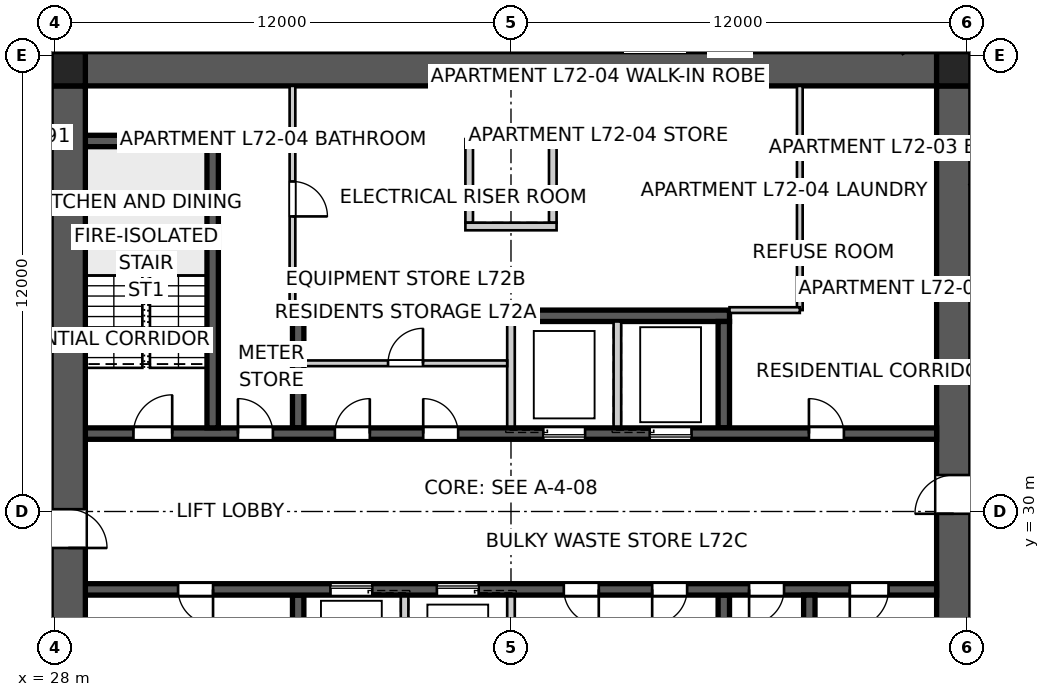
"""IFC4 building model, lengths in metres.
Left out: names, types, materials, properties, quantities, classifications, styles, units other than length and angle.
Written with IfcOpenShell. Run it as: python <this file> out.ifc"""

import sys

from ifc_helpers import new_model, si_unit, direction, frame, frame_2d, origin, origin_2d, place, context, subcontext, project, spatial, polyline, rectangle, outline, extrude, element, fill, save


model = new_model("IFC4")
c1 = context("Model", 3, precision=1e-05, world=origin(), true_north=direction((0.0, 1.0)))
c2 = subcontext(c1, "Body", "Model", "MODEL_VIEW")
j1 = project(units=[si_unit("LENGTHUNIT", "METRE"), si_unit("PLANEANGLEUNIT", "RADIAN")], contexts=[c1])
p1 = place(None, origin())
s1 = spatial("IfcSite", under=j1, at=p1, CompositionType="ELEMENT")
p2 = place(p1, origin())
s2 = spatial("IfcBuilding", under=s1, at=p2, CompositionType="ELEMENT")
p3 = place(p2, frame((0.0, 0.0, 260.8)))
s3 = spatial("IfcBuildingStorey", under=s2, at=p3, CompositionType="ELEMENT", Elevation=260.8)
p4 = place(p3, frame((28.8, 41.65, 0.0), z_axis=(0.0, 0.0, 1.0), x_axis=(1.0, 0.0, 0.0)))
e1 = element("IfcWall", 1, at=p4, inside=s3, PredefinedType="SHEAR", context=c2, shape_type="SweptSolid", body=[
    extrude(outline(polyline([(0.0, -0.45), (22.4, -0.45), (22.4, -0.025), (22.85, -0.025), (22.85, 0.025), (22.4, 0.025), (22.4, 0.45), (0.0, 0.45), (0.0, 0.025), (-0.45, 0.025), (-0.45, -0.025), (0.0, -0.025), (0.0, -0.45)])), origin(), (0.0, 0.0, 1.0), 3.4),
])
p5 = place(p3, frame((51.65, 18.8, 0.0), z_axis=(0.0, 0.0, 1.0), x_axis=(0.0, 1.0, 0.0)))
e2 = element("IfcWall", 2, at=p5, inside=s3, PredefinedType="SHEAR", context=c2, shape_type="SweptSolid", body=[
    extrude(outline(polyline([(0.0, -0.45), (22.4, -0.45), (22.4, -0.025), (22.85, -0.025), (22.85, 0.025), (22.4, 0.025), (22.4, 0.45), (0.0, 0.45), (0.0, 0.025), (-0.45, 0.025), (-0.45, -0.025), (0.0, -0.025), (0.0, -0.45)])), origin(), (0.0, 0.0, 1.0), 3.4),
])
p6 = place(p5, frame((11.14, 0.0, 0.0)))
e3 = element("IfcOpeningElement", 3, at=p6, cuts=e2, PredefinedType="OPENING", context=c2, shape_type="SweptSolid", body=[
    extrude(rectangle(XDim=1.02, YDim=2.4, at=frame_2d((0.51, 1.2))), frame((0.0, 0.46, 0.0), z_axis=(0.0, -1.0, 0.0), x_axis=(1.0, 0.0, 0.0)), (0.0, 0.0, 1.0), 0.92),
])
p7 = place(p3, frame((28.35, 41.2, 0.0), z_axis=(0.0, 0.0, 1.0), x_axis=(0.0, -1.0, 0.0)))
e4 = element("IfcWall", 4, at=p7, inside=s3, PredefinedType="SHEAR", context=c2, shape_type="SweptSolid", body=[
    extrude(outline(polyline([(0.0, -0.45), (22.4, -0.45), (22.4, -0.025), (22.85, -0.025), (22.85, 0.025), (22.4, 0.025), (22.4, 0.45), (0.0, 0.45), (0.0, 0.025), (-0.45, 0.025), (-0.45, -0.025), (0.0, -0.025), (0.0, -0.45)])), origin(), (0.0, 0.0, 1.0), 3.4),
])
p8 = place(p7, frame((11.14, 0.0, 0.0)))
e5 = element("IfcOpeningElement", 5, at=p8, cuts=e4, PredefinedType="OPENING", context=c2, shape_type="SweptSolid", body=[
    extrude(rectangle(XDim=1.02, YDim=2.4, at=frame_2d((0.51, 1.2))), frame((0.0, 0.46, 0.0), z_axis=(0.0, -1.0, 0.0), x_axis=(1.0, 0.0, 0.0)), (0.0, 0.0, 1.0), 0.92),
])
p9 = place(p3, frame((28.8, 32.05, 0.0), z_axis=(0.0, 0.0, 1.0), x_axis=(1.0, 0.0, 0.0)))
e6 = element("IfcWall", 6, at=p9, inside=s3, PredefinedType="SHEAR", context=c2, shape_type="SweptSolid", body=[
    extrude(rectangle(XDim=22.4, YDim=0.3, at=frame_2d((11.2, 0.0))), origin(), (0.0, 0.0, 1.0), 3.4),
])
p10 = place(p9, frame((19.04, 0.0, 0.0)))
e7 = element("IfcOpeningElement", 7, at=p10, cuts=e6, PredefinedType="OPENING", context=c2, shape_type="SweptSolid", body=[
    extrude(rectangle(XDim=0.92, YDim=2.1, at=frame_2d((0.46, 1.05))), frame((0.0, 0.16, 0.0), z_axis=(0.0, -1.0, 0.0), x_axis=(1.0, 0.0, 0.0)), (0.0, 0.0, 1.0), 0.32),
])
p11 = place(p9, frame((1.265, 0.0, 0.0)))
e8 = element("IfcOpeningElement", 8, at=p11, cuts=e6, PredefinedType="OPENING", context=c2, shape_type="SweptSolid", body=[
    extrude(rectangle(XDim=1.02, YDim=2.1, at=frame_2d((0.51, 1.05))), frame((0.0, 0.16, 0.0), z_axis=(0.0, -1.0, 0.0), x_axis=(1.0, 0.0, 0.0)), (0.0, 0.0, 1.0), 0.32),
])
p12 = place(p9, frame((4.015, 0.0, 0.0)))
e9 = element("IfcOpeningElement", 9, at=p12, cuts=e6, PredefinedType="OPENING", context=c2, shape_type="SweptSolid", body=[
    extrude(rectangle(XDim=0.92, YDim=2.1, at=frame_2d((0.46, 1.05))), frame((0.0, 0.16, 0.0), z_axis=(0.0, -1.0, 0.0), x_axis=(1.0, 0.0, 0.0)), (0.0, 0.0, 1.0), 0.32),
])
p13 = place(p9, frame((6.565, 0.0, 0.0)))
e10 = element("IfcOpeningElement", 10, at=p13, cuts=e6, PredefinedType="OPENING", context=c2, shape_type="SweptSolid", body=[
    extrude(rectangle(XDim=0.92, YDim=2.1, at=frame_2d((0.46, 1.05))), frame((0.0, 0.16, 0.0), z_axis=(0.0, -1.0, 0.0), x_axis=(1.0, 0.0, 0.0)), (0.0, 0.0, 1.0), 0.32),
])
p14 = place(p9, frame((8.89, 0.0, 0.0)))
e11 = element("IfcOpeningElement", 11, at=p14, cuts=e6, PredefinedType="OPENING", context=c2, shape_type="SweptSolid", body=[
    extrude(rectangle(XDim=0.92, YDim=2.1, at=frame_2d((0.46, 1.05))), frame((0.0, 0.16, 0.0), z_axis=(0.0, -1.0, 0.0), x_axis=(1.0, 0.0, 0.0)), (0.0, 0.0, 1.0), 0.32),
])
p15 = place(p9, frame((12.05, 0.0, 0.0)))
e12 = element("IfcOpeningElement", 12, at=p15, cuts=e6, PredefinedType="OPENING", context=c2, shape_type="SweptSolid", body=[
    extrude(rectangle(XDim=1.1, YDim=2.1, at=frame_2d((0.55, 1.05))), frame((0.0, 0.16, 0.0), z_axis=(0.0, -1.0, 0.0), x_axis=(1.0, 0.0, 0.0)), (0.0, 0.0, 1.0), 0.32),
])
p16 = place(p9, frame((14.85, 0.0, 0.0)))
e13 = element("IfcOpeningElement", 13, at=p16, cuts=e6, PredefinedType="OPENING", context=c2, shape_type="SweptSolid", body=[
    extrude(rectangle(XDim=1.1, YDim=2.1, at=frame_2d((0.55, 1.05))), frame((0.0, 0.16, 0.0), z_axis=(0.0, -1.0, 0.0), x_axis=(1.0, 0.0, 0.0)), (0.0, 0.0, 1.0), 0.32),
])
p17 = place(p3, frame((51.2, 27.95, 0.0), z_axis=(0.0, 0.0, 1.0), x_axis=(-1.0, 0.0, 0.0)))
e14 = element("IfcWall", 14, at=p17, inside=s3, PredefinedType="SHEAR", context=c2, shape_type="SweptSolid", body=[
    extrude(rectangle(XDim=22.4, YDim=0.3, at=frame_2d((11.2, 0.0))), origin(), (0.0, 0.0, 1.0), 3.4),
])
p18 = place(p17, frame((19.04, 0.0, 0.0)))
e15 = element("IfcOpeningElement", 15, at=p18, cuts=e14, PredefinedType="OPENING", context=c2, shape_type="SweptSolid", body=[
    extrude(rectangle(XDim=0.92, YDim=2.1, at=frame_2d((0.46, 1.05))), frame((0.0, 0.16, 0.0), z_axis=(0.0, -1.0, 0.0), x_axis=(1.0, 0.0, 0.0)), (0.0, 0.0, 1.0), 0.32),
])
p19 = place(p17, frame((1.265, 0.0, 0.0)))
e16 = element("IfcOpeningElement", 16, at=p19, cuts=e14, PredefinedType="OPENING", context=c2, shape_type="SweptSolid", body=[
    extrude(rectangle(XDim=1.02, YDim=2.1, at=frame_2d((0.51, 1.05))), frame((0.0, 0.16, 0.0), z_axis=(0.0, -1.0, 0.0), x_axis=(1.0, 0.0, 0.0)), (0.0, 0.0, 1.0), 0.32),
])
p20 = place(p17, frame((4.015, 0.0, 0.0)))
e17 = element("IfcOpeningElement", 17, at=p20, cuts=e14, PredefinedType="OPENING", context=c2, shape_type="SweptSolid", body=[
    extrude(rectangle(XDim=0.92, YDim=2.1, at=frame_2d((0.46, 1.05))), frame((0.0, 0.16, 0.0), z_axis=(0.0, -1.0, 0.0), x_axis=(1.0, 0.0, 0.0)), (0.0, 0.0, 1.0), 0.32),
])
p21 = place(p17, frame((8.89, 0.0, 0.0)))
e18 = element("IfcOpeningElement", 18, at=p21, cuts=e14, PredefinedType="OPENING", context=c2, shape_type="SweptSolid", body=[
    extrude(rectangle(XDim=0.92, YDim=2.1, at=frame_2d((0.46, 1.05))), frame((0.0, 0.16, 0.0), z_axis=(0.0, -1.0, 0.0), x_axis=(1.0, 0.0, 0.0)), (0.0, 0.0, 1.0), 0.32),
])
p22 = place(p17, frame((6.565, 0.0, 0.0)))
e19 = element("IfcOpeningElement", 19, at=p22, cuts=e14, PredefinedType="OPENING", context=c2, shape_type="SweptSolid", body=[
    extrude(rectangle(XDim=0.92, YDim=2.1, at=frame_2d((0.46, 1.05))), frame((0.0, 0.16, 0.0), z_axis=(0.0, -1.0, 0.0), x_axis=(1.0, 0.0, 0.0)), (0.0, 0.0, 1.0), 0.32),
])
p23 = place(p17, frame((12.05, 0.0, 0.0)))
e20 = element("IfcOpeningElement", 20, at=p23, cuts=e14, PredefinedType="OPENING", context=c2, shape_type="SweptSolid", body=[
    extrude(rectangle(XDim=1.1, YDim=2.1, at=frame_2d((0.55, 1.05))), frame((0.0, 0.16, 0.0), z_axis=(0.0, -1.0, 0.0), x_axis=(1.0, 0.0, 0.0)), (0.0, 0.0, 1.0), 0.32),
])
p24 = place(p17, frame((14.85, 0.0, 0.0)))
e21 = element("IfcOpeningElement", 21, at=p24, cuts=e14, PredefinedType="OPENING", context=c2, shape_type="SweptSolid", body=[
    extrude(rectangle(XDim=1.1, YDim=2.1, at=frame_2d((0.55, 1.05))), frame((0.0, 0.16, 0.0), z_axis=(0.0, -1.0, 0.0), x_axis=(1.0, 0.0, 0.0)), (0.0, 0.0, 1.0), 0.32),
])
p25 = place(p3, frame((34.25, 35.15, 0.0), z_axis=(0.0, 0.0, 1.0), x_axis=(1.0, 0.0, 0.0)))
e22 = element("IfcWall", 22, at=p25, inside=s3, PredefinedType="SHEAR", context=c2, shape_type="SweptSolid", body=[
    extrude(rectangle(XDim=11.5, YDim=0.3, at=frame_2d((5.75, 0.0))), origin(), (0.0, 0.0, 1.0), 3.4),
])
for number, where, z_axis, x_axis in (
    (23, (34.4, 32.2, 0.0), (0.0, 0.0, 1.0), (0.0, 1.0, 0.0)),
    (24, (45.6, 27.8, 0.0), (0.0, 0.0, 1.0), (0.0, -1.0, 0.0)),
):
    element("IfcWall", number, at=place(p3, frame(where, z_axis=z_axis, x_axis=x_axis)), inside=s3, PredefinedType="SHEAR", context=c2, shape_type="SweptSolid", body=[
        extrude(rectangle(XDim=2.8, YDim=0.3, at=frame_2d((1.4, 0.0))), origin(), (0.0, 0.0, 1.0), 3.4),
    ])
for number, where, z_axis, x_axis in (
    (25, (40.0, 32.2, 0.0), (0.0, 0.0, 1.0), (0.0, 1.0, 0.0)),
    (26, (40.0, 27.8, 0.0), (0.0, 0.0, 1.0), (0.0, -1.0, 0.0)),
    (27, (42.8, 32.2, 0.0), (0.0, 0.0, 1.0), (0.0, 1.0, 0.0)),
    (28, (37.2, 27.8, 0.0), (0.0, 0.0, 1.0), (0.0, -1.0, 0.0)),
):
    element("IfcWall", number, at=place(p3, frame(where, z_axis=z_axis, x_axis=x_axis)), inside=s3, PredefinedType="SOLIDWALL", context=c2, shape_type="SweptSolid", body=[
        extrude(rectangle(XDim=2.8, YDim=0.2, at=frame_2d((1.4, 0.0))), origin(), (0.0, 0.0, 1.0), 3.4),
    ])
for number, where, z_axis, x_axis in (
    (29, (45.6, 32.2, 0.0), (0.0, 0.0, 1.0), (0.0, 1.0, 0.0)),
    (30, (34.4, 27.8, 0.0), (0.0, 0.0, 1.0), (0.0, -1.0, 0.0)),
):
    element("IfcWall", number, at=place(p3, frame(where, z_axis=z_axis, x_axis=x_axis)), inside=s3, PredefinedType="SHEAR", context=c2, shape_type="SweptSolid", body=[
        extrude(rectangle(XDim=2.8, YDim=0.3, at=frame_2d((1.4, 0.0))), origin(), (0.0, 0.0, 1.0), 3.4),
    ])
p26 = place(p3, frame((32.15, 32.2, 0.0), z_axis=(0.0, 0.0, 1.0), x_axis=(0.0, 1.0, 0.0)))
e31 = element("IfcWall", 31, at=p26, inside=s3, PredefinedType="SHEAR", context=c2, shape_type="SweptSolid", body=[
    extrude(rectangle(XDim=7.7, YDim=0.3, at=frame_2d((3.85, 0.0))), origin(), (0.0, 0.0, 1.0), 3.4),
])
p27 = place(p3, frame((28.8, 39.75, 0.0), z_axis=(0.0, 0.0, 1.0), x_axis=(1.0, 0.0, 0.0)))
e32 = element("IfcWall", 32, at=p27, inside=s3, PredefinedType="SHEAR", context=c2, shape_type="SweptSolid", body=[
    extrude(rectangle(XDim=3.5, YDim=0.3, at=frame_2d((1.75, 0.0))), origin(), (0.0, 0.0, 1.0), 3.4),
])
p28 = place(p3, frame((47.85, 27.8, 0.0), z_axis=(0.0, 0.0, 1.0), x_axis=(0.0, -1.0, 0.0)))
e33 = element("IfcWall", 33, at=p28, inside=s3, PredefinedType="SHEAR", context=c2, shape_type="SweptSolid", body=[
    extrude(rectangle(XDim=7.7, YDim=0.3, at=frame_2d((3.85, 0.0))), origin(), (0.0, 0.0, 1.0), 3.4),
])
for number, where, z_axis, x_axis in (
    (34, (38.9, 37.6, 0.0), (0.0, 0.0, 1.0), (0.0, 1.0, 0.0)),
    (35, (41.1, 37.6, 0.0), (0.0, 0.0, 1.0), (0.0, 1.0, 0.0)),
):
    element("IfcWall", number, at=place(p3, frame(where, z_axis=z_axis, x_axis=x_axis)), inside=s3, PredefinedType="SOLIDWALL", context=c2, shape_type="SweptSolid", body=[
        extrude(rectangle(XDim=2.0, YDim=0.2, at=frame_2d((1.0, 0.0))), origin(), (0.0, 0.0, 1.0), 3.4),
    ])
for number, where, z_axis, x_axis in (
    (36, (38.8, 37.5, 0.0), (0.0, 0.0, 1.0), (1.0, 0.0, 0.0)),
    (37, (38.8, 39.7, 0.0), (0.0, 0.0, 1.0), (1.0, 0.0, 0.0)),
):
    element("IfcWall", number, at=place(p3, frame(where, z_axis=z_axis, x_axis=x_axis)), inside=s3, PredefinedType="SOLIDWALL", context=c2, shape_type="SweptSolid", body=[
        extrude(rectangle(XDim=2.4, YDim=0.2, at=frame_2d((1.2, 0.0))), origin(), (0.0, 0.0, 1.0), 3.4),
    ])
for number, where, z_axis, x_axis in (
    (38, (51.65, 41.65, 0.0), (0.0, 0.0, 1.0), (1.0, 0.0, 0.0)),
    (39, (28.35, 41.65, 0.0), (0.0, 0.0, 1.0), (1.0, 0.0, 0.0)),
):
    element("IfcColumn", number, at=place(p3, frame(where, z_axis=z_axis, x_axis=x_axis)), inside=s3, PredefinedType="COLUMN", context=c2, shape_type="SweptSolid", body=[
        extrude(rectangle(XDim=0.9, YDim=0.9, at=origin_2d()), origin(), (0.0, 0.0, 1.0), 3.4),
    ])
p29 = place(p3, frame((57.612, 42.332, 0.0), z_axis=(0.0, 0.0, 1.0), x_axis=(-0.819161528122, -0.573562891796, 0.0)))
e40 = element("IfcWall", 40, at=p29, inside=s3, PredefinedType="PARTITIONING", context=c2, shape_type="SweptSolid", body=[
    extrude(rectangle(XDim=6.681, YDim=0.25, at=frame_2d((3.341, 0.0))), origin(), (0.0, 0.0, 1.0), 3.25),
])
p30 = place(p3, frame((34.25, 41.2, 0.0), z_axis=(0.0, 0.0, 1.0), x_axis=(0.0, -1.0, 0.0)))
e41 = element("IfcWall", 41, at=p30, inside=s3, PredefinedType="SOLIDWALL", context=c2, shape_type="SweptSolid", body=[
    extrude(rectangle(XDim=5.95, YDim=0.15, at=frame_2d((2.975, 0.0))), origin(), (0.0, 0.0, 1.0), 3.25),
])
p31 = place(p30, frame((2.515, 0.0, 0.0)))
e42 = element("IfcOpeningElement", 42, at=p31, cuts=e41, PredefinedType="OPENING", context=c2, shape_type="SweptSolid", body=[
    extrude(rectangle(XDim=0.92, YDim=2.1, at=frame_2d((0.46, 1.05))), frame((0.0, 0.085, 0.0), z_axis=(0.0, -1.0, 0.0), x_axis=(1.0, 0.0, 0.0)), (0.0, 0.0, 1.0), 0.17),
])
p32 = place(p3, frame((47.6, 41.2, 0.0), z_axis=(0.0, 0.0, 1.0), x_axis=(0.0, -1.0, 0.0)))
e43 = element("IfcWall", 43, at=p32, inside=s3, PredefinedType="SOLIDWALL", context=c2, shape_type="SweptSolid", body=[
    extrude(rectangle(XDim=5.9, YDim=0.15, at=frame_2d((2.95, 0.0))), origin(), (0.0, 0.0, 1.0), 3.25),
])
p33 = place(p3, frame((47.6, 35.3, 0.0), z_axis=(0.0, 0.0, 1.0), x_axis=(-1.0, 0.0, 0.0)))
e44 = element("IfcWall", 44, at=p33, inside=s3, PredefinedType="SOLIDWALL", context=c2, shape_type="SweptSolid", body=[
    extrude(rectangle(XDim=1.85, YDim=0.15, at=frame_2d((0.925, 0.0))), origin(), (0.0, 0.0, 1.0), 3.25),
])
p34 = place(p3, frame((55.271, 45.605, 0.0), z_axis=(0.0, 0.0, 1.0), x_axis=(-0.819158711158, -0.573566914958, 0.0)))
e45 = element("IfcWall", 45, at=p34, inside=s3, PredefinedType="SOLIDWALL", context=c2, shape_type="SweptSolid", body=[
    extrude(rectangle(XDim=6.111, YDim=0.15, at=frame_2d((3.055, 0.0))), origin(), (0.0, 0.0, 1.0), 3.25),
])
p35 = place(p34, frame((2.575, 0.0, 0.0)))
e46 = element("IfcOpeningElement", 46, at=p35, cuts=e45, PredefinedType="OPENING", context=c2, shape_type="SweptSolid", body=[
    extrude(rectangle(XDim=0.92, YDim=2.34, at=frame_2d((0.46, 1.17))), frame((0.0, 0.085, 0.0), z_axis=(0.0, -1.0, 0.0), x_axis=(1.0, 0.0, 0.0)), (0.0, 0.0, 1.0), 0.17),
])
p36 = place(p3, frame((34.55, 33.9, 0.0), z_axis=(0.0, 0.0, 1.0), x_axis=(1.0, 0.0, 0.0)))
e47 = element("IfcWall", 47, at=p36, inside=s3, PredefinedType="SOLIDWALL", context=c2, shape_type="SweptSolid", body=[
    extrude(rectangle(XDim=5.35, YDim=0.15, at=frame_2d((2.675, 0.0))), origin(), (0.0, 0.0, 1.0), 3.25),
])
p37 = place(p36, frame((2.215, 0.0, 0.0)))
e48 = element("IfcOpeningElement", 48, at=p37, cuts=e47, PredefinedType="OPENING", context=c2, shape_type="SweptSolid", body=[
    extrude(rectangle(XDim=0.92, YDim=2.1, at=frame_2d((0.46, 1.05))), frame((0.0, 0.085, 0.0), z_axis=(0.0, -1.0, 0.0), x_axis=(1.0, 0.0, 0.0)), (0.0, 0.0, 1.0), 0.17),
])
p38 = place(p10, origin())
e49 = element("IfcDoor", 49, at=p38, inside=s3, OperationType="SINGLE_SWING_LEFT", PredefinedType="DOOR", context=c2, shape_type="SweptSolid", body=[
    extrude(rectangle(XDim=0.92, YDim=2.1, at=frame_2d((0.46, 1.05))), frame((0.0, 0.025, 0.0), z_axis=(0.0, -1.0, 0.0), x_axis=(1.0, 0.0, 0.0)), (0.0, 0.0, 1.0), 0.05),
])
fill(e7, e49)
p39 = place(p18, origin())
e50 = element("IfcDoor", 50, at=p39, inside=s3, OperationType="SINGLE_SWING_LEFT", PredefinedType="DOOR", context=c2, shape_type="SweptSolid", body=[
    extrude(rectangle(XDim=0.92, YDim=2.1, at=frame_2d((0.46, 1.05))), frame((0.0, 0.025, 0.0), z_axis=(0.0, -1.0, 0.0), x_axis=(1.0, 0.0, 0.0)), (0.0, 0.0, 1.0), 0.05),
])
fill(e15, e50)
p40 = place(p19, origin())
e51 = element("IfcDoor", 51, at=p40, inside=s3, OperationType="SINGLE_SWING_RIGHT", PredefinedType="DOOR", context=c2, shape_type="SweptSolid", body=[
    extrude(rectangle(XDim=1.02, YDim=2.1, at=frame_2d((0.51, 1.05))), frame((0.0, 0.025, 0.0), z_axis=(0.0, -1.0, 0.0), x_axis=(1.0, 0.0, 0.0)), (0.0, 0.0, 1.0), 0.05),
])
fill(e16, e51)
p41 = place(p11, origin())
e52 = element("IfcDoor", 52, at=p41, inside=s3, OperationType="SINGLE_SWING_RIGHT", PredefinedType="DOOR", context=c2, shape_type="SweptSolid", body=[
    extrude(rectangle(XDim=1.02, YDim=2.1, at=frame_2d((0.51, 1.05))), frame((0.0, 0.025, 0.0), z_axis=(0.0, -1.0, 0.0), x_axis=(1.0, 0.0, 0.0)), (0.0, 0.0, 1.0), 0.05),
])
fill(e8, e52)
p42 = place(p12, origin())
e53 = element("IfcDoor", 53, at=p42, inside=s3, OperationType="SINGLE_SWING_LEFT", PredefinedType="DOOR", context=c2, shape_type="SweptSolid", body=[
    extrude(rectangle(XDim=0.92, YDim=2.1, at=frame_2d((0.46, 1.05))), frame((0.0, 0.025, 0.0), z_axis=(0.0, -1.0, 0.0), x_axis=(1.0, 0.0, 0.0)), (0.0, 0.0, 1.0), 0.05),
])
fill(e9, e53)
p43 = place(p20, origin())
e54 = element("IfcDoor", 54, at=p43, inside=s3, OperationType="SINGLE_SWING_RIGHT", PredefinedType="DOOR", context=c2, shape_type="SweptSolid", body=[
    extrude(rectangle(XDim=0.92, YDim=2.1, at=frame_2d((0.46, 1.05))), frame((0.0, 0.025, 0.0), z_axis=(0.0, -1.0, 0.0), x_axis=(1.0, 0.0, 0.0)), (0.0, 0.0, 1.0), 0.05),
])
fill(e17, e54)
p44 = place(p31, origin())
e55 = element("IfcDoor", 55, at=p44, inside=s3, OperationType="SINGLE_SWING_RIGHT", PredefinedType="DOOR", context=c2, shape_type="SweptSolid", body=[
    extrude(rectangle(XDim=0.92, YDim=2.1, at=frame_2d((0.46, 1.05))), frame((0.0, 0.025, 0.0), z_axis=(0.0, -1.0, 0.0), x_axis=(1.0, 0.0, 0.0)), (0.0, 0.0, 1.0), 0.05),
])
fill(e42, e55)
p45 = place(p13, origin())
e56 = element("IfcDoor", 56, at=p45, inside=s3, OperationType="SINGLE_SWING_RIGHT", PredefinedType="DOOR", context=c2, shape_type="SweptSolid", body=[
    extrude(rectangle(XDim=0.92, YDim=2.1, at=frame_2d((0.46, 1.05))), frame((0.0, 0.025, 0.0), z_axis=(0.0, -1.0, 0.0), x_axis=(1.0, 0.0, 0.0)), (0.0, 0.0, 1.0), 0.05),
])
fill(e10, e56)
p46 = place(p14, origin())
e57 = element("IfcDoor", 57, at=p46, inside=s3, OperationType="SINGLE_SWING_LEFT", PredefinedType="DOOR", context=c2, shape_type="SweptSolid", body=[
    extrude(rectangle(XDim=0.92, YDim=2.1, at=frame_2d((0.46, 1.05))), frame((0.0, 0.025, 0.0), z_axis=(0.0, -1.0, 0.0), x_axis=(1.0, 0.0, 0.0)), (0.0, 0.0, 1.0), 0.05),
])
fill(e11, e57)
p47 = place(p37, origin())
e58 = element("IfcDoor", 58, at=p47, inside=s3, OperationType="SINGLE_SWING_RIGHT", PredefinedType="DOOR", context=c2, shape_type="SweptSolid", body=[
    extrude(rectangle(XDim=0.92, YDim=2.1, at=frame_2d((0.46, 1.05))), frame((0.0, 0.025, 0.0), z_axis=(0.0, -1.0, 0.0), x_axis=(1.0, 0.0, 0.0)), (0.0, 0.0, 1.0), 0.05),
])
fill(e48, e58)
p48 = place(p21, origin())
e59 = element("IfcDoor", 59, at=p48, inside=s3, OperationType="SINGLE_SWING_LEFT", PredefinedType="DOOR", context=c2, shape_type="SweptSolid", body=[
    extrude(rectangle(XDim=0.92, YDim=2.1, at=frame_2d((0.46, 1.05))), frame((0.0, 0.025, 0.0), z_axis=(0.0, -1.0, 0.0), x_axis=(1.0, 0.0, 0.0)), (0.0, 0.0, 1.0), 0.05),
])
fill(e18, e59)
p49 = place(p22, origin())
e60 = element("IfcDoor", 60, at=p49, inside=s3, OperationType="SINGLE_SWING_RIGHT", PredefinedType="DOOR", context=c2, shape_type="SweptSolid", body=[
    extrude(rectangle(XDim=0.92, YDim=2.1, at=frame_2d((0.46, 1.05))), frame((0.0, 0.025, 0.0), z_axis=(0.0, -1.0, 0.0), x_axis=(1.0, 0.0, 0.0)), (0.0, 0.0, 1.0), 0.05),
])
fill(e19, e60)
p50 = place(p6, origin())
e61 = element("IfcDoor", 61, at=p50, inside=s3, OperationType="SINGLE_SWING_LEFT", PredefinedType="DOOR", context=c2, shape_type="SweptSolid", body=[
    extrude(rectangle(XDim=1.02, YDim=2.4, at=frame_2d((0.51, 1.2))), frame((0.0, 0.025, 0.0), z_axis=(0.0, -1.0, 0.0), x_axis=(1.0, 0.0, 0.0)), (0.0, 0.0, 1.0), 0.05),
])
fill(e3, e61)
p51 = place(p8, origin())
e62 = element("IfcDoor", 62, at=p51, inside=s3, OperationType="SINGLE_SWING_RIGHT", PredefinedType="DOOR", context=c2, shape_type="SweptSolid", body=[
    extrude(rectangle(XDim=1.02, YDim=2.4, at=frame_2d((0.51, 1.2))), frame((0.0, 0.025, 0.0), z_axis=(0.0, -1.0, 0.0), x_axis=(1.0, 0.0, 0.0)), (0.0, 0.0, 1.0), 0.05),
])
fill(e5, e62)
p52 = place(p15, origin())
e63 = element("IfcDoor", 63, at=p52, inside=s3, OperationType="SLIDING_TO_LEFT", PredefinedType="DOOR", context=c2, shape_type="SweptSolid", body=[
    extrude(rectangle(XDim=1.1, YDim=2.1, at=frame_2d((0.55, 1.05))), frame((0.0, 0.025, 0.0), z_axis=(0.0, -1.0, 0.0), x_axis=(1.0, 0.0, 0.0)), (0.0, 0.0, 1.0), 0.05),
])
fill(e12, e63)
p53 = place(p23, origin())
e64 = element("IfcDoor", 64, at=p53, inside=s3, OperationType="SLIDING_TO_LEFT", PredefinedType="DOOR", context=c2, shape_type="SweptSolid", body=[
    extrude(rectangle(XDim=1.1, YDim=2.1, at=frame_2d((0.55, 1.05))), frame((0.0, 0.025, 0.0), z_axis=(0.0, -1.0, 0.0), x_axis=(1.0, 0.0, 0.0)), (0.0, 0.0, 1.0), 0.05),
])
fill(e20, e64)
p54 = place(p16, origin())
e65 = element("IfcDoor", 65, at=p54, inside=s3, OperationType="SLIDING_TO_LEFT", PredefinedType="DOOR", context=c2, shape_type="SweptSolid", body=[
    extrude(rectangle(XDim=1.1, YDim=2.1, at=frame_2d((0.55, 1.05))), frame((0.0, 0.025, 0.0), z_axis=(0.0, -1.0, 0.0), x_axis=(1.0, 0.0, 0.0)), (0.0, 0.0, 1.0), 0.05),
])
fill(e13, e65)
p55 = place(p24, origin())
e66 = element("IfcDoor", 66, at=p55, inside=s3, OperationType="SLIDING_TO_LEFT", PredefinedType="DOOR", context=c2, shape_type="SweptSolid", body=[
    extrude(rectangle(XDim=1.1, YDim=2.1, at=frame_2d((0.55, 1.05))), frame((0.0, 0.025, 0.0), z_axis=(0.0, -1.0, 0.0), x_axis=(1.0, 0.0, 0.0)), (0.0, 0.0, 1.0), 0.05),
])
fill(e21, e66)
save(model, sys.argv[1])
